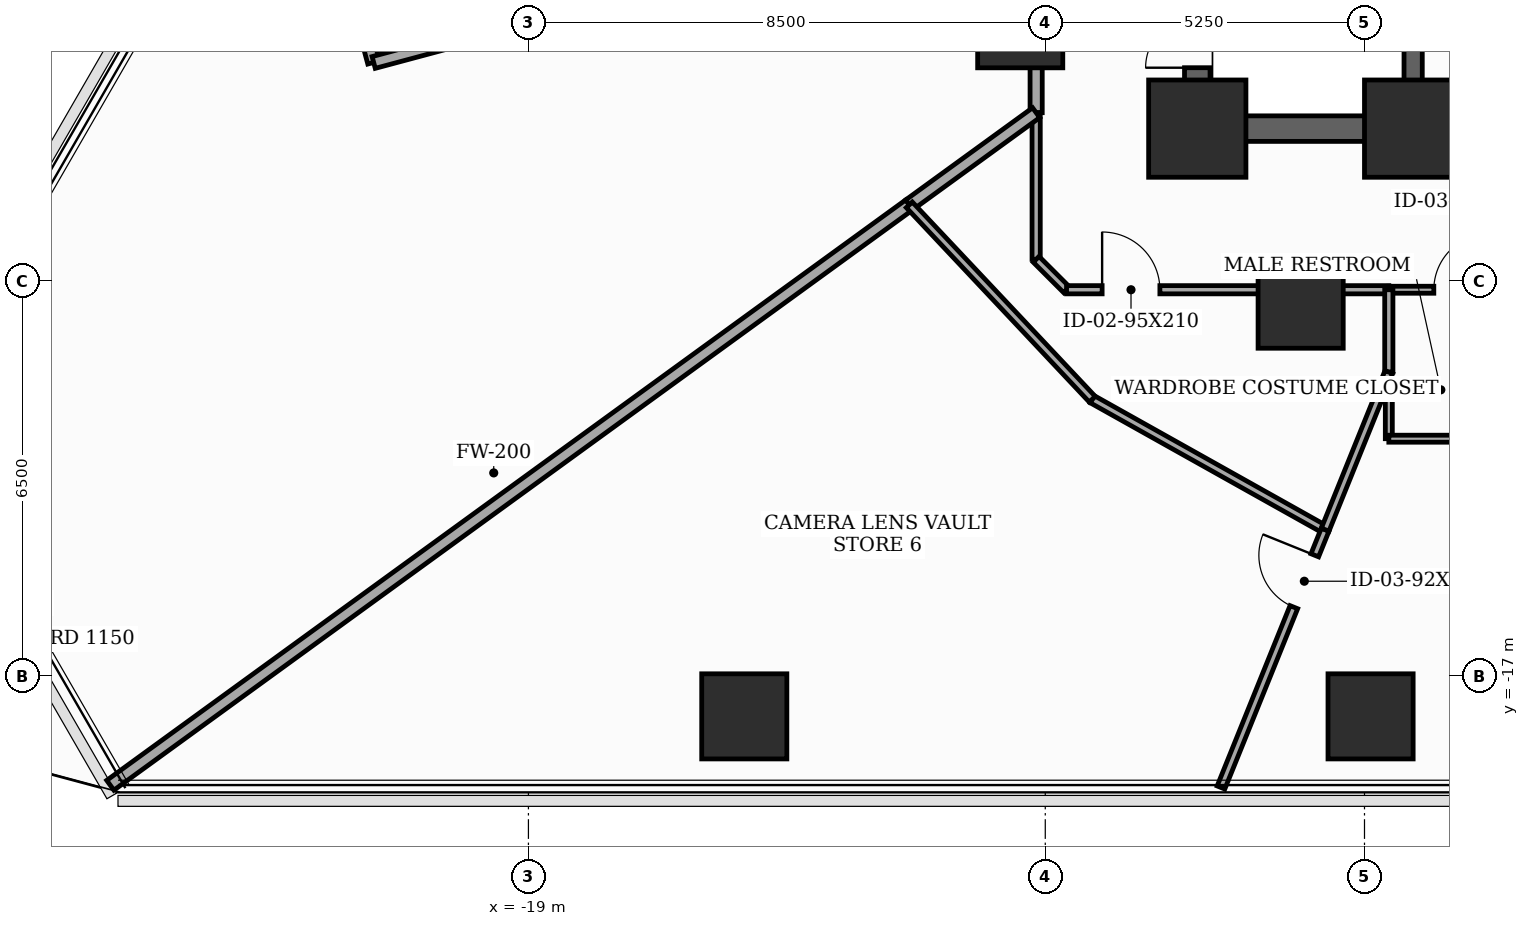
"""IFC4 building model, lengths in metres.
Left out: names, types, materials, properties, quantities, classifications, styles, units other than length and angle.
Written with IfcOpenShell. Run it as: python <this file> out.ifc"""

import sys

from ifc_helpers import new_model, si_unit, direction, frame, frame_2d, origin, origin_2d, place, context, subcontext, project, spatial, rectangle, extrude, element, fill, save


model = new_model("IFC4")
c1 = context("Model", 3, precision=1e-05, world=origin(), true_north=direction((0.0, 1.0)))
c2 = subcontext(c1, "Body", "Model", "MODEL_VIEW")
j1 = project(units=[si_unit("LENGTHUNIT", "METRE"), si_unit("PLANEANGLEUNIT", "RADIAN")], contexts=[c1])
p1 = place(None, origin())
s1 = spatial("IfcSite", under=j1, at=p1, CompositionType="ELEMENT")
p2 = place(p1, origin())
s2 = spatial("IfcBuilding", under=s1, at=p2, CompositionType="ELEMENT")
p3 = place(p2, frame((0.0, 0.0, 40.8)))
s3 = spatial("IfcBuildingStorey", under=s2, at=p3, CompositionType="ELEMENT", Elevation=40.8)
for number, where, z_axis, x_axis in (
    (1, (-8.0, -8.0, 0.0), (0.0, 0.0, 1.0), (1.0, 0.0, 0.0)),
    (2, (-4.45, -8.0, 0.0), (0.0, 0.0, 1.0), (1.0, 0.0, 0.0)),
):
    element("IfcColumn", number, at=place(p3, frame(where, z_axis=z_axis, x_axis=x_axis)), inside=s3, PredefinedType="COLUMN", context=c2, shape_type="SweptSolid", body=[
        extrude(rectangle(XDim=1.6, YDim=1.6, at=origin_2d()), origin(), (0.0, 0.0, 1.0), 3.7),
    ])
for number, where, z_axis, x_axis in (
    (3, (-10.912, -6.3, 0.0), (0.0, 0.0, 1.0), (1.0, 0.0, 0.0)),
    (4, (-6.3, -10.912, 0.0), (0.0, 0.0, 1.0), (1.0, 0.0, 0.0)),
    (5, (-15.45, -17.667, 0.0), (0.0, 0.0, 1.0), (1.0, 0.0, 0.0)),
    (6, (-5.15, -17.667, 0.0), (0.0, 0.0, 1.0), (1.0, 0.0, 0.0)),
):
    element("IfcColumn", number, at=place(p3, frame(where, z_axis=z_axis, x_axis=x_axis)), inside=s3, PredefinedType="COLUMN", context=c2, shape_type="SweptSolid", body=[
        extrude(rectangle(XDim=1.4, YDim=1.4, at=origin_2d()), origin(), (0.0, 0.0, 1.0), 3.7),
    ])
p4 = place(p3, frame((-8.0, -8.0, 0.0), z_axis=(0.0, 0.0, 1.0), x_axis=(0.0, 1.0, 0.0)))
e7 = element("IfcWall", 7, at=p4, inside=s3, PredefinedType="SHEAR", context=c2, shape_type="SweptSolid", body=[
    extrude(rectangle(XDim=16.0, YDim=0.42, at=frame_2d((8.0, 0.0))), origin(), (0.0, 0.0, 1.0), 3.5),
])
p5 = place(p4, frame((1.002, 0.0, 0.0)))
e8 = element("IfcOpeningElement", 8, at=p5, cuts=e7, PredefinedType="OPENING", context=c2, shape_type="SweptSolid", body=[
    extrude(rectangle(XDim=0.85, YDim=2.02, at=frame_2d((0.425, 1.01))), frame((0.0, 0.22, 0.0), z_axis=(0.0, -1.0, 0.0), x_axis=(1.0, 0.0, 0.0)), (0.0, 0.0, 1.0), 0.44),
])
p6 = place(p4, frame((5.35, 0.0, 0.0)))
e9 = element("IfcOpeningElement", 9, at=p6, cuts=e7, PredefinedType="OPENING", context=c2, shape_type="SweptSolid", body=[
    extrude(rectangle(XDim=1.05, YDim=2.15, at=frame_2d((0.525, 1.075))), frame((0.0, 0.22, 0.0), z_axis=(0.0, -1.0, 0.0), x_axis=(1.0, 0.0, 0.0)), (0.0, 0.0, 1.0), 0.44),
])
p7 = place(p3, frame((-8.0, -8.0, 0.0), z_axis=(0.0, 0.0, 1.0), x_axis=(1.0, 0.0, 0.0)))
e10 = element("IfcWall", 10, at=p7, inside=s3, PredefinedType="SHEAR", context=c2, shape_type="SweptSolid", body=[
    extrude(rectangle(XDim=16.0, YDim=0.42, at=frame_2d((8.0, 0.0))), origin(), (0.0, 0.0, 1.0), 3.5),
])
p8 = place(p7, frame((4.6, 0.0, 0.0)))
e11 = element("IfcOpeningElement", 11, at=p8, cuts=e10, PredefinedType="OPENING", context=c2, shape_type="SweptSolid", body=[
    extrude(rectangle(XDim=0.95, YDim=2.1, at=frame_2d((0.475, 1.05))), frame((0.0, 0.22, 0.0), z_axis=(0.0, -1.0, 0.0), x_axis=(1.0, 0.0, 0.0)), (0.0, 0.0, 1.0), 0.44),
])
p9 = place(p7, frame((7.52, 0.0, 0.0)))
e12 = element("IfcOpeningElement", 12, at=p9, cuts=e10, PredefinedType="OPENING", context=c2, shape_type="SweptSolid", body=[
    extrude(rectangle(XDim=0.95, YDim=2.1, at=frame_2d((0.475, 1.05))), frame((0.0, 0.22, 0.0), z_axis=(0.0, -1.0, 0.0), x_axis=(1.0, 0.0, 0.0)), (0.0, 0.0, 1.0), 0.44),
])
p10 = place(p7, frame((10.45, 0.0, 0.0)))
e13 = element("IfcOpeningElement", 13, at=p10, cuts=e10, PredefinedType="OPENING", context=c2, shape_type="SweptSolid", body=[
    extrude(rectangle(XDim=0.95, YDim=2.1, at=frame_2d((0.475, 1.05))), frame((0.0, 0.22, 0.0), z_axis=(0.0, -1.0, 0.0), x_axis=(1.0, 0.0, 0.0)), (0.0, 0.0, 1.0), 0.44),
])
p11 = place(p3, frame((-4.45, -7.79, 0.0), z_axis=(0.0, 0.0, 1.0), x_axis=(0.0, 1.0, 0.0)))
e14 = element("IfcWall", 14, at=p11, inside=s3, PredefinedType="SHEAR", context=c2, shape_type="SweptSolid", body=[
    extrude(rectangle(XDim=15.58, YDim=0.3, at=frame_2d((7.79, 0.0))), origin(), (0.0, 0.0, 1.0), 3.5),
])
p12 = place(p3, frame((-22.115, -4.787, 0.0), z_axis=(0.0, 0.0, 1.0), x_axis=(0.259105843213, -0.965848933329, 0.0)))
e15 = element("IfcWall", 15, at=p12, inside=s3, PredefinedType="SOLIDWALL", context=c2, shape_type="SweptSolid", body=[
    extrude(rectangle(XDim=2.2, YDim=0.2, at=frame_2d((1.1, 0.0))), origin(), (0.0, 0.0, 1.0), 2.935),
])
p13 = place(p3, frame((-21.545, -6.912, 0.0), z_axis=(0.0, 0.0, 1.0), x_axis=(0.965906888357, 0.258889712088, 0.0)))
e16 = element("IfcWall", 16, at=p13, inside=s3, PredefinedType="SOLIDWALL", context=c2, shape_type="SweptSolid", body=[
    extrude(rectangle(XDim=11.28, YDim=0.2, at=frame_2d((5.64, 0.0))), origin(), (0.0, 0.0, 1.0), 2.785),
])
p14 = place(p3, frame((-10.65, -3.992, 0.0), z_axis=(0.0, 0.0, 1.0), x_axis=(0.0, -1.0, 0.0)))
e17 = element("IfcWall", 17, at=p14, inside=s3, PredefinedType="SOLIDWALL", context=c2, shape_type="SweptSolid", body=[
    extrude(rectangle(XDim=3.746, YDim=0.2, at=frame_2d((1.873, 0.0))), origin(), (0.0, 0.0, 1.0), 2.785),
])
p15 = place(p3, frame((-10.65, -7.738, 0.0), z_axis=(0.0, 0.0, 1.0), x_axis=(0.0, -1.0, 0.0)))
e18 = element("IfcWall", 18, at=p15, inside=s3, PredefinedType="PARTITIONING", context=c2, shape_type="SweptSolid", body=[
    extrude(rectangle(XDim=2.412, YDim=0.135, at=frame_2d((1.206, 0.0))), origin(), (0.0, 0.0, 1.0), 3.5),
])
p16 = place(p3, frame((-10.65, -10.15, 0.0), z_axis=(0.0, 0.0, 1.0), x_axis=(0.707106781187, -0.707106781187, 0.0)))
e19 = element("IfcWall", 19, at=p16, inside=s3, PredefinedType="PARTITIONING", context=c2, shape_type="SweptSolid", body=[
    extrude(rectangle(XDim=0.707, YDim=0.135, at=frame_2d((0.354, 0.0))), origin(), (0.0, 0.0, 1.0), 3.5),
])
p17 = place(p3, frame((-10.15, -10.65, 0.0), z_axis=(0.0, 0.0, 1.0), x_axis=(1.0, 0.0, 0.0)))
e20 = element("IfcWall", 20, at=p17, inside=s3, PredefinedType="PARTITIONING", context=c2, shape_type="SweptSolid", body=[
    extrude(rectangle(XDim=5.3, YDim=0.135, at=frame_2d((2.65, 0.0))), origin(), (0.0, 0.0, 1.0), 2.785),
])
p18 = place(p17, frame((0.585, 0.0, 0.0)))
e21 = element("IfcOpeningElement", 21, at=p18, cuts=e20, PredefinedType="OPENING", context=c2, shape_type="SweptSolid", body=[
    extrude(rectangle(XDim=0.95, YDim=2.1, at=frame_2d((0.475, 1.05))), frame((0.0, 0.077, 0.0), z_axis=(0.0, -1.0, 0.0), x_axis=(1.0, 0.0, 0.0)), (0.0, 0.0, 1.0), 0.155),
])
p19 = place(p3, frame((-4.85, -10.65, 0.0), z_axis=(0.0, 0.0, 1.0), x_axis=(1.0, 0.0, 0.0)))
e22 = element("IfcWall", 22, at=p19, inside=s3, PredefinedType="PARTITIONING", context=c2, shape_type="SweptSolid", body=[
    extrude(rectangle(XDim=2.4, YDim=0.115, at=frame_2d((1.2, 0.0))), origin(), (0.0, 0.0, 1.0), 3.5),
])
p20 = place(p19, frame((0.74, 0.0, 0.0)))
e23 = element("IfcOpeningElement", 23, at=p20, cuts=e22, PredefinedType="OPENING", context=c2, shape_type="SweptSolid", body=[
    extrude(rectangle(XDim=0.92, YDim=2.1, at=frame_2d((0.46, 1.05))), frame((0.0, 0.067, 0.0), z_axis=(0.0, -1.0, 0.0), x_axis=(1.0, 0.0, 0.0)), (0.0, 0.0, 1.0), 0.135),
])
p21 = place(p3, frame((-25.876, -18.8, 0.0), z_axis=(0.0, 0.0, 1.0), x_axis=(0.809014839236, 0.587788218575, 0.0)))
e24 = element("IfcWall", 24, at=p21, inside=s3, PredefinedType="SOLIDWALL", context=c2, shape_type="SweptSolid", body=[
    extrude(rectangle(XDim=16.242, YDim=0.2, at=frame_2d((8.121, 0.0))), origin(), (0.0, 0.0, 1.0), 2.935),
])
p22 = place(p3, frame((-12.736, -9.253, 0.0), z_axis=(0.0, 0.0, 1.0), x_axis=(0.809165833136, 0.587580338749, 0.0)))
e25 = element("IfcWall", 25, at=p22, inside=s3, PredefinedType="SOLIDWALL", context=c2, shape_type="SweptSolid", body=[
    extrude(rectangle(XDim=2.578, YDim=0.2, at=frame_2d((1.289, 0.0))), origin(), (0.0, 0.0, 1.0), 3.5),
])
p23 = place(p3, frame((-5.897, -14.596, 0.0), z_axis=(0.0, 0.0, 1.0), x_axis=(-0.87248894478, 0.488633851915, 0.0)))
e26 = element("IfcWall", 26, at=p23, inside=s3, PredefinedType="PARTITIONING", context=c2, shape_type="SweptSolid", body=[
    extrude(rectangle(XDim=4.39, YDim=0.135, at=frame_2d((2.195, 0.0))), origin(), (0.0, 0.0, 1.0), 2.685),
])
p24 = place(p3, frame((-9.727, -12.451, 0.0), z_axis=(0.0, 0.0, 1.0), x_axis=(-0.685262368975, 0.728296289752, 0.0)))
e27 = element("IfcWall", 27, at=p24, inside=s3, PredefinedType="PARTITIONING", context=c2, shape_type="SweptSolid", body=[
    extrude(rectangle(XDim=4.391, YDim=0.135, at=frame_2d((2.196, 0.0))), origin(), (0.0, 0.0, 1.0), 3.5),
])
p25 = place(p3, frame((-7.61, -18.837, 0.0), z_axis=(0.0, 0.0, 1.0), x_axis=(0.374545124537, 0.927208687236, 0.0)))
e28 = element("IfcWall", 28, at=p25, inside=s3, PredefinedType="PARTITIONING", context=c2, shape_type="SweptSolid", body=[
    extrude(rectangle(XDim=4.574, YDim=0.135, at=frame_2d((2.287, 0.0))), origin(), (0.0, 0.0, 1.0), 2.685),
])
p26 = place(p25, frame((3.199, 0.0, 0.0)))
e29 = element("IfcOpeningElement", 29, at=p26, cuts=e28, PredefinedType="OPENING", context=c2, shape_type="SweptSolid", body=[
    extrude(rectangle(XDim=0.92, YDim=2.1, at=frame_2d((0.46, 1.05))), frame((0.0, 0.077, 0.0), z_axis=(0.0, -1.0, 0.0), x_axis=(1.0, 0.0, 0.0)), (0.0, 0.0, 1.0), 0.155),
])
p27 = place(p3, frame((-4.85, -12.004, 0.0), z_axis=(0.0, 0.0, 1.0), x_axis=(0.0, 1.0, 0.0)))
e30 = element("IfcWall", 30, at=p27, inside=s3, PredefinedType="PARTITIONING", context=c2, shape_type="SweptSolid", body=[
    extrude(rectangle(XDim=1.354, YDim=0.135, at=frame_2d((0.677, 0.0))), origin(), (0.0, 0.0, 1.0), 2.785),
])
p28 = place(p3, frame((-5.897, -14.596, 0.0), z_axis=(0.0, 0.0, 1.0), x_axis=(0.374490485533, 0.92723075674, 0.0)))
e31 = element("IfcWall", 31, at=p28, inside=s3, PredefinedType="PARTITIONING", context=c2, shape_type="SweptSolid", body=[
    extrude(rectangle(XDim=2.795, YDim=0.135, at=frame_2d((1.398, 0.0))), origin(), (0.0, 0.0, 1.0), 2.685),
])
p29 = place(p3, frame((-4.85, -12.298, 0.0), z_axis=(0.0, 0.0, 1.0), x_axis=(0.0, -1.0, 0.0)))
e32 = element("IfcWall", 32, at=p29, inside=s3, PredefinedType="PARTITIONING", context=c2, shape_type="SweptSolid", body=[
    extrude(rectangle(XDim=0.802, YDim=0.115, at=frame_2d((0.401, 0.0))), origin(), (0.0, 0.0, 1.0), 3.5),
])
p30 = place(p3, frame((-4.85, -13.1, 0.0), z_axis=(0.0, 0.0, 1.0), x_axis=(1.0, 0.0, 0.0)))
e33 = element("IfcWall", 33, at=p30, inside=s3, PredefinedType="PARTITIONING", context=c2, shape_type="SweptSolid", body=[
    extrude(rectangle(XDim=2.4, YDim=0.115, at=frame_2d((1.2, 0.0))), origin(), (0.0, 0.0, 1.0), 3.5),
])
p31 = place(p5, origin())
e34 = element("IfcDoor", 34, at=p31, inside=s3, OperationType="SINGLE_SWING_LEFT", PredefinedType="TRAPDOOR", context=c2, shape_type="SweptSolid", body=[
    extrude(rectangle(XDim=0.85, YDim=2.02, at=frame_2d((0.425, 1.01))), frame((0.0, 0.025, 0.0), z_axis=(0.0, -1.0, 0.0), x_axis=(1.0, 0.0, 0.0)), (0.0, 0.0, 1.0), 0.05),
])
fill(e8, e34)
p32 = place(p18, origin())
e35 = element("IfcDoor", 35, at=p32, inside=s3, OperationType="SINGLE_SWING_LEFT", PredefinedType="DOOR", context=c2, shape_type="SweptSolid", body=[
    extrude(rectangle(XDim=0.95, YDim=2.1, at=frame_2d((0.475, 1.05))), frame((0.0, 0.025, 0.0), z_axis=(0.0, -1.0, 0.0), x_axis=(1.0, 0.0, 0.0)), (0.0, 0.0, 1.0), 0.05),
])
fill(e21, e35)
p33 = place(p20, origin())
e36 = element("IfcDoor", 36, at=p33, inside=s3, OperationType="SINGLE_SWING_RIGHT", PredefinedType="DOOR", context=c2, shape_type="SweptSolid", body=[
    extrude(rectangle(XDim=0.92, YDim=2.1, at=frame_2d((0.46, 1.05))), frame((0.0, 0.025, 0.0), z_axis=(0.0, -1.0, 0.0), x_axis=(1.0, 0.0, 0.0)), (0.0, 0.0, 1.0), 0.05),
])
fill(e23, e36)
p34 = place(p26, origin())
e37 = element("IfcDoor", 37, at=p34, inside=s3, OperationType="SINGLE_SWING_RIGHT", PredefinedType="DOOR", context=c2, shape_type="SweptSolid", body=[
    extrude(rectangle(XDim=0.92, YDim=2.1, at=frame_2d((0.46, 1.05))), frame((0.0, 0.025, 0.0), z_axis=(0.0, -1.0, 0.0), x_axis=(1.0, 0.0, 0.0)), (0.0, 0.0, 1.0), 0.05),
])
fill(e29, e37)
save(model, sys.argv[1])
